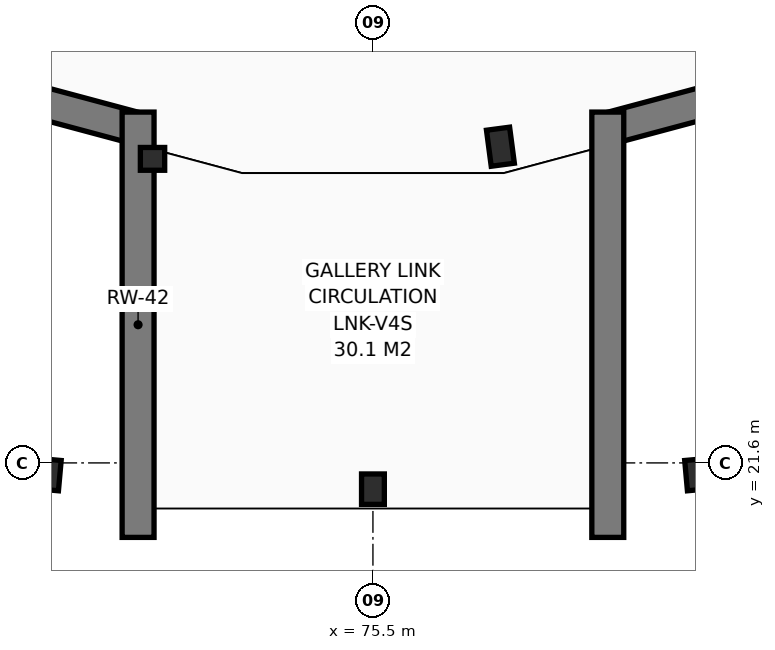
"""IFC4 building model, lengths in metres.
Left out: names, types, materials, properties, quantities, classifications, styles, units other than length and angle.
Written with IfcOpenShell. Run it as: python <this file> out.ifc"""

import sys

from ifc_helpers import new_model, si_unit, direction, frame, frame_2d, origin, origin_2d, place, context, subcontext, project, spatial, rectangle, i_section, extrude, element, save


model = new_model("IFC4")
c1 = context("Model", 3, precision=1e-05, world=origin(), true_north=direction((0.0, 1.0)))
c2 = subcontext(c1, "Body", "Model", "MODEL_VIEW")
j1 = project(units=[si_unit("LENGTHUNIT", "METRE"), si_unit("PLANEANGLEUNIT", "RADIAN")], contexts=[c1])
p1 = place(None, origin())
s1 = spatial("IfcSite", under=j1, at=p1, CompositionType="ELEMENT")
p2 = place(p1, origin())
s2 = spatial("IfcBuilding", under=s1, at=p2, CompositionType="ELEMENT")
p3 = place(p2, frame((0.0, 0.0, -4.8)))
s3 = spatial("IfcBuildingStorey", under=s2, at=p3, CompositionType="ELEMENT", Elevation=-4.8)
for number, where, z_axis, x_axis in (
    (1, (71.231, 21.446, 0.0), (0.0, 0.0, 1.0), (0.089, 0.996, 0.0)),
    (2, (75.5, 21.255, 0.0), (0.0, 0.0, 1.0), (0.0, 1.0, 0.0)),
    (3, (79.769, 21.446, 0.0), (0.0, 0.0, 1.0), (-0.089, 0.996, 0.0)),
):
    element("IfcColumn", number, at=place(p3, frame(where, z_axis=z_axis, x_axis=x_axis)), inside=s3, PredefinedType="COLUMN", context=c2, shape_type="SweptSolid", body=[
        extrude(i_section(OverallWidth=0.3, OverallDepth=0.4, WebThickness=0.013, FlangeThickness=0.024, FilletRadius=0.027, at=origin_2d()), origin(), (0.0, 0.0, 1.0), 4.8),
    ])
p4 = place(p3, frame((77.177, 25.76, 0.0), z_axis=(0.0, 0.0, 1.0), x_axis=(0.13052619222, -0.991444861374, 0.0)))
e4 = element("IfcColumn", 4, at=p4, inside=s3, PredefinedType="COLUMN", context=c2, shape_type="SweptSolid", body=[
    extrude(i_section(OverallWidth=0.307, OverallDepth=0.478, WebThickness=0.021, FlangeThickness=0.04, FilletRadius=0.027, at=origin_2d()), origin(), (0.0, 0.0, 1.0), 4.8),
])
p5 = place(p3, frame((72.6, 25.6, 0.0), z_axis=(0.0, 0.0, 1.0), x_axis=(1.0, 0.0, 0.0)))
e5 = element("IfcColumn", 5, at=p5, inside=s3, PredefinedType="COLUMN", context=c2, shape_type="SweptSolid", body=[
    extrude(i_section(OverallWidth=0.3, OverallDepth=0.32, WebThickness=0.011, FlangeThickness=0.021, FilletRadius=0.027, at=origin_2d()), origin(), (0.0, 0.0, 1.0), 4.8),
])
p6 = place(p3, frame((80.673, 26.555, 0.0), z_axis=(0.0, 0.0, 1.0), x_axis=(-0.965925492833, -0.258820289575, 0.0)))
e6 = element("IfcWall", 6, at=p6, inside=s3, PredefinedType="USERDEFINED", context=c2, shape_type="SweptSolid", body=[
    extrude(rectangle(XDim=2.271, YDim=0.42, at=frame_2d((1.135, 0.0))), origin(), (0.0, 0.0, 1.0), 4.55),
])
p7 = place(p3, frame((72.52, 25.967, 0.0), z_axis=(0.0, 0.0, 1.0), x_axis=(-0.965935358697, 0.25878346705, 0.0)))
e7 = element("IfcWall", 7, at=p7, inside=s3, PredefinedType="USERDEFINED", context=c2, shape_type="SweptSolid", body=[
    extrude(rectangle(XDim=2.06, YDim=0.42, at=frame_2d((1.03, 0.0))), origin(), (0.0, 0.0, 1.0), 4.55),
])
for number, where, z_axis, x_axis in (
    (8, (72.41, 20.62, 0.0), (0.0, 0.0, 1.0), (0.0, 1.0, 0.0)),
    (9, (78.59, 26.216, 0.0), (0.0, 0.0, 1.0), (0.0, -1.0, 0.0)),
):
    element("IfcWall", number, at=place(p3, frame(where, z_axis=z_axis, x_axis=x_axis)), inside=s3, PredefinedType="USERDEFINED", context=c2, shape_type="SweptSolid", body=[
        extrude(rectangle(XDim=5.595, YDim=0.42, at=frame_2d((2.798, 0.0))), origin(), (0.0, 0.0, 1.0), 4.55),
    ])
save(model, sys.argv[1])
